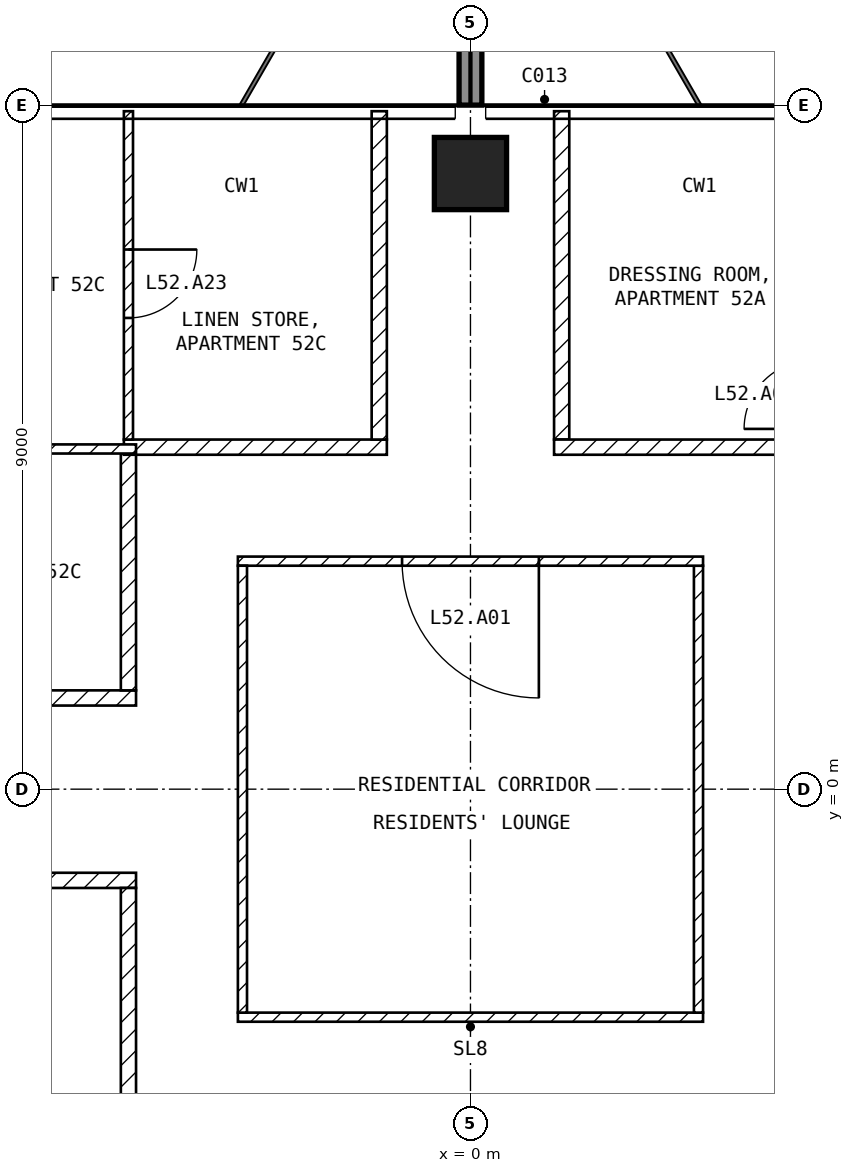
"""IFC4 building model, lengths in metres.
Left out: names, types, materials, properties, quantities, classifications, styles, units other than length and angle.
Written with IfcOpenShell. Run it as: python <this file> out.ifc"""

import sys

from ifc_helpers import new_model, si_unit, direction, frame, frame_2d, origin, origin_2d, place, context, subcontext, project, spatial, rectangle, extrude, element, fill, save


model = new_model("IFC4")
c1 = context("Model", 3, precision=1e-05, world=origin(), true_north=direction((0.0, 1.0)))
c2 = subcontext(c1, "Body", "Model", "MODEL_VIEW")
j1 = project(units=[si_unit("LENGTHUNIT", "METRE"), si_unit("PLANEANGLEUNIT", "RADIAN")], contexts=[c1])
p1 = place(None, origin())
s1 = spatial("IfcSite", under=j1, at=p1, CompositionType="ELEMENT")
p2 = place(p1, origin())
s2 = spatial("IfcBuilding", under=s1, at=p2, CompositionType="ELEMENT")
p3 = place(p2, frame((0.0, 0.0, 208.6)))
s3 = spatial("IfcBuildingStorey", under=s2, at=p3, CompositionType="ELEMENT", Elevation=208.6)
p4 = place(p3, frame((0.0, 8.1, -0.25), z_axis=(0.0, 0.0, 1.0), x_axis=(1.0, 0.0, 0.0)))
e1 = element("IfcColumn", 1, at=p4, inside=s3, PredefinedType="COLUMN", context=c2, shape_type="SweptSolid", body=[
    extrude(rectangle(XDim=0.95, YDim=0.95, at=origin_2d()), origin(), (0.0, 0.0, 1.0), 3.5),
])
p5 = place(p3, frame((0.0, 9.0, 0.0), z_axis=(0.0, 0.0, 1.0), x_axis=(0.0, 1.0, 0.0)))
e2 = element("IfcWall", 2, at=p5, inside=s3, PredefinedType="SOLIDWALL", context=c2, shape_type="SweptSolid", body=[
    extrude(rectangle(XDim=2.7, YDim=0.3, at=frame_2d((1.35, 0.0))), origin(), (0.0, 0.0, 1.0), 3.25),
])
p6 = place(p3, frame((-3.06, -3.0, 0.0), z_axis=(0.0, 0.0, 1.0), x_axis=(1.0, 0.0, 0.0)))
e3 = element("IfcWall", 3, at=p6, inside=s3, PredefinedType="PARTITIONING", context=c2, shape_type="SweptSolid", body=[
    extrude(rectangle(XDim=6.12, YDim=0.12, at=frame_2d((3.06, 0.0))), origin(), (0.0, 0.0, 1.0), 3.25),
])
p7 = place(p3, frame((3.0, -2.94, 0.0), z_axis=(0.0, 0.0, 1.0), x_axis=(0.0, 1.0, 0.0)))
e4 = element("IfcWall", 4, at=p7, inside=s3, PredefinedType="PARTITIONING", context=c2, shape_type="SweptSolid", body=[
    extrude(rectangle(XDim=5.88, YDim=0.12, at=frame_2d((2.94, 0.0))), origin(), (0.0, 0.0, 1.0), 3.25),
])
p8 = place(p3, frame((3.06, 3.0, 0.0), z_axis=(0.0, 0.0, 1.0), x_axis=(-1.0, 0.0, 0.0)))
e5 = element("IfcWall", 5, at=p8, inside=s3, PredefinedType="PARTITIONING", context=c2, shape_type="SweptSolid", body=[
    extrude(rectangle(XDim=6.12, YDim=0.12, at=frame_2d((3.06, 0.0))), origin(), (0.0, 0.0, 1.0), 3.25),
])
p9 = place(p8, frame((2.16, 0.0, 0.0)))
e6 = element("IfcOpeningElement", 6, at=p9, cuts=e5, PredefinedType="OPENING", context=c2, shape_type="SweptSolid", body=[
    extrude(rectangle(XDim=1.8, YDim=2.1, at=frame_2d((0.9, 1.05))), frame((0.0, 0.07, 0.0), z_axis=(0.0, -1.0, 0.0), x_axis=(1.0, 0.0, 0.0)), (0.0, 0.0, 1.0), 0.14),
])
p10 = place(p3, frame((-3.0, 2.94, 0.0), z_axis=(0.0, 0.0, 1.0), x_axis=(0.0, -1.0, 0.0)))
e7 = element("IfcWall", 7, at=p10, inside=s3, PredefinedType="PARTITIONING", context=c2, shape_type="SweptSolid", body=[
    extrude(rectangle(XDim=5.88, YDim=0.12, at=frame_2d((2.94, 0.0))), origin(), (0.0, 0.0, 1.0), 3.25),
])
p11 = place(p3, frame((1.2, 8.92, 0.0), z_axis=(0.0, 0.0, 1.0), x_axis=(0.0, -1.0, 0.0)))
e8 = element("IfcWall", 8, at=p11, inside=s3, PredefinedType="PARTITIONING", context=c2, shape_type="SweptSolid", body=[
    extrude(rectangle(XDim=4.32, YDim=0.2, at=frame_2d((2.16, 0.0))), origin(), (0.0, 0.0, 1.0), 3.25),
])
p12 = place(p3, frame((1.1, 4.5, 0.0), z_axis=(0.0, 0.0, 1.0), x_axis=(1.0, 0.0, 0.0)))
e9 = element("IfcWall", 9, at=p12, inside=s3, PredefinedType="PARTITIONING", context=c2, shape_type="SweptSolid", body=[
    extrude(rectangle(XDim=3.5, YDim=0.2, at=frame_2d((1.75, 0.0))), origin(), (0.0, 0.0, 1.0), 3.25),
])
p13 = place(p3, frame((-21.6, 1.2, 0.0), z_axis=(0.0, 0.0, 1.0), x_axis=(1.0, 0.0, 0.0)))
e10 = element("IfcWall", 10, at=p13, inside=s3, PredefinedType="PARTITIONING", context=c2, shape_type="SweptSolid", body=[
    extrude(rectangle(XDim=17.2, YDim=0.2, at=frame_2d((8.6, 0.0))), origin(), (0.0, 0.0, 1.0), 3.25),
])
p14 = place(p13, frame((4.075, 0.0, 0.0)))
e11 = element("IfcOpeningElement", 11, at=p14, cuts=e10, PredefinedType="OPENING", context=c2, shape_type="SweptSolid", body=[
    extrude(rectangle(XDim=1.0, YDim=2.1, at=frame_2d((0.5, 1.05))), frame((0.0, 0.11, 0.0), z_axis=(0.0, -1.0, 0.0), x_axis=(1.0, 0.0, 0.0)), (0.0, 0.0, 1.0), 0.22),
])
p15 = place(p3, frame((-4.5, 1.3, 0.0), z_axis=(0.0, 0.0, 1.0), x_axis=(0.0, 1.0, 0.0)))
e12 = element("IfcWall", 12, at=p15, inside=s3, PredefinedType="PARTITIONING", context=c2, shape_type="SweptSolid", body=[
    extrude(rectangle(XDim=3.116, YDim=0.2, at=frame_2d((1.558, 0.0))), origin(), (0.0, 0.0, 1.0), 3.25),
])
p16 = place(p3, frame((-4.56, 4.5, 0.0), z_axis=(0.0, 0.0, 1.0), x_axis=(1.0, 0.0, 0.0)))
e13 = element("IfcWall", 13, at=p16, inside=s3, PredefinedType="PARTITIONING", context=c2, shape_type="SweptSolid", body=[
    extrude(rectangle(XDim=3.46, YDim=0.2, at=frame_2d((1.73, 0.0))), origin(), (0.0, 0.0, 1.0), 3.25),
])
p17 = place(p3, frame((-1.2, 4.6, 0.0), z_axis=(0.0, 0.0, 1.0), x_axis=(0.0, 1.0, 0.0)))
e14 = element("IfcWall", 14, at=p17, inside=s3, PredefinedType="PARTITIONING", context=c2, shape_type="SweptSolid", body=[
    extrude(rectangle(XDim=4.32, YDim=0.2, at=frame_2d((2.16, 0.0))), origin(), (0.0, 0.0, 1.0), 3.25),
])
p18 = place(p3, frame((-4.4, -1.2, 0.0), z_axis=(0.0, 0.0, 1.0), x_axis=(-1.0, 0.0, 0.0)))
e15 = element("IfcWall", 15, at=p18, inside=s3, PredefinedType="PARTITIONING", context=c2, shape_type="SweptSolid", body=[
    extrude(rectangle(XDim=17.2, YDim=0.2, at=frame_2d((8.6, 0.0))), origin(), (0.0, 0.0, 1.0), 3.25),
])
p19 = place(p18, frame((7.7, 0.0, 0.0)))
e16 = element("IfcOpeningElement", 16, at=p19, cuts=e15, PredefinedType="OPENING", context=c2, shape_type="SweptSolid", body=[
    extrude(rectangle(XDim=1.0, YDim=2.1, at=frame_2d((0.5, 1.05))), frame((0.0, 0.11, 0.0), z_axis=(0.0, -1.0, 0.0), x_axis=(1.0, 0.0, 0.0)), (0.0, 0.0, 1.0), 0.22),
])
p20 = place(p3, frame((-4.5, -4.5, 0.0), z_axis=(0.0, 0.0, 1.0), x_axis=(0.0, 1.0, 0.0)))
e17 = element("IfcWall", 17, at=p20, inside=s3, PredefinedType="PARTITIONING", context=c2, shape_type="SweptSolid", body=[
    extrude(rectangle(XDim=3.2, YDim=0.2, at=frame_2d((1.6, 0.0))), origin(), (0.0, 0.0, 1.0), 3.25),
])
p21 = place(p3, frame((-9.06, 4.476, 0.0), z_axis=(0.0, 0.0, 1.0), x_axis=(1.0, 0.0, 0.0)))
e18 = element("IfcWall", 18, at=p21, inside=s3, PredefinedType="PARTITIONING", context=c2, shape_type="SweptSolid", body=[
    extrude(rectangle(XDim=4.66, YDim=0.12, at=frame_2d((2.33, 0.0))), origin(), (0.0, 0.0, 1.0), 3.25),
])
p22 = place(p21, frame((1.86, 0.0, 0.0)))
e19 = element("IfcOpeningElement", 19, at=p22, cuts=e18, PredefinedType="OPENING", context=c2, shape_type="SweptSolid", body=[
    extrude(rectangle(XDim=0.9, YDim=2.1, at=frame_2d((0.45, 1.05))), frame((0.0, 0.07, 0.0), z_axis=(0.0, -1.0, 0.0), x_axis=(1.0, 0.0, 0.0)), (0.0, 0.0, 1.0), 0.14),
])
p23 = place(p3, frame((-4.5, 8.92, 0.0), z_axis=(0.0, 0.0, 1.0), x_axis=(0.0, -1.0, 0.0)))
e20 = element("IfcWall", 20, at=p23, inside=s3, PredefinedType="PARTITIONING", context=c2, shape_type="SweptSolid", body=[
    extrude(rectangle(XDim=4.32, YDim=0.12, at=frame_2d((2.16, 0.0))), origin(), (0.0, 0.0, 1.0), 3.25),
])
p24 = place(p23, frame((1.82, 0.0, 0.0)))
e21 = element("IfcOpeningElement", 21, at=p24, cuts=e20, PredefinedType="OPENING", context=c2, shape_type="SweptSolid", body=[
    extrude(rectangle(XDim=0.9, YDim=2.1, at=frame_2d((0.45, 1.05))), frame((0.0, 0.07, 0.0), z_axis=(0.0, -1.0, 0.0), x_axis=(1.0, 0.0, 0.0)), (0.0, 0.0, 1.0), 0.14),
])
p25 = place(p9, origin())
e22 = element("IfcDoor", 22, at=p25, inside=s3, OperationType="SINGLE_SWING_LEFT", PredefinedType="DOOR", context=c2, shape_type="SweptSolid", body=[
    extrude(rectangle(XDim=1.8, YDim=2.1, at=frame_2d((0.9, 1.05))), frame((0.0, 0.025, 0.0), z_axis=(0.0, -1.0, 0.0), x_axis=(1.0, 0.0, 0.0)), (0.0, 0.0, 1.0), 0.05),
])
fill(e6, e22)
p26 = place(p24, origin())
e23 = element("IfcDoor", 23, at=p26, inside=s3, OperationType="SINGLE_SWING_LEFT", PredefinedType="DOOR", context=c2, shape_type="SweptSolid", body=[
    extrude(rectangle(XDim=0.9, YDim=2.1, at=frame_2d((0.45, 1.05))), frame((0.0, 0.025, 0.0), z_axis=(0.0, -1.0, 0.0), x_axis=(1.0, 0.0, 0.0)), (0.0, 0.0, 1.0), 0.05),
])
fill(e21, e23)
save(model, sys.argv[1])
